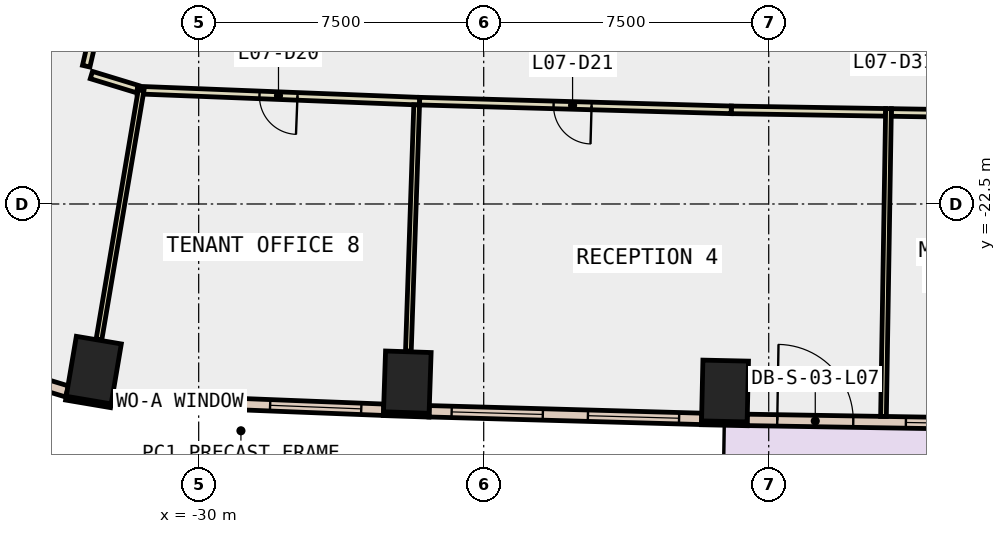
"""IFC4 building model, lengths in metres.
Left out: names, types, materials, properties, quantities, classifications, styles, units other than length and angle.
Written with IfcOpenShell. Run it as: python <this file> out.ifc"""

import sys

from ifc_helpers import new_model, si_unit, direction, frame, frame_2d, origin, origin_2d, place, context, subcontext, project, spatial, rectangle, extrude, element, fill, save


model = new_model("IFC4")
c1 = context("Model", 3, precision=1e-05, world=origin(), true_north=direction((0.0, 1.0)))
c2 = subcontext(c1, "Body", "Model", "MODEL_VIEW")
j1 = project(units=[si_unit("LENGTHUNIT", "METRE"), si_unit("PLANEANGLEUNIT", "RADIAN")], contexts=[c1])
p1 = place(None, origin())
s1 = spatial("IfcSite", under=j1, at=p1, CompositionType="ELEMENT")
p2 = place(p1, origin())
s2 = spatial("IfcBuilding", under=s1, at=p2, CompositionType="ELEMENT")
p3 = place(p2, frame((0.0, 0.0, 39.2)))
s3 = spatial("IfcBuildingStorey", under=s2, at=p3, CompositionType="ELEMENT", Elevation=39.2)
for number, where, z_axis, x_axis in (
    (1, (-32.761, -26.871, -0.4), (0.0, 0.0, 1.0), (-0.986, 0.167, 0.0)),
    (2, (-24.51, -27.188, -0.4), (0.0, 0.0, 1.0), (-0.999, 0.034, 0.0)),
    (3, (-16.15, -27.421, -0.4), (0.0, 0.0, 1.0), (-1.0, 0.022, 0.0)),
):
    element("IfcColumn", number, at=place(p3, frame(where, z_axis=z_axis, x_axis=x_axis)), inside=s3, PredefinedType="COLUMN", context=c2, shape_type="SweptSolid", body=[
        extrude(rectangle(XDim=1.2, YDim=1.6, at=origin_2d()), origin(), (0.0, 0.0, 1.0), 4.2),
    ])
for number, where, z_axis, x_axis in (
    (4, (-33.494, -27.609, 0.0), (0.0, 0.0, 1.0), (0.986, -0.167, 0.0)),
    (5, (-25.138, -28.017, 0.0), (0.0, 0.0, 1.0), (0.999, -0.033, 0.0)),
):
    element("IfcWall", number, at=place(p3, frame(where, z_axis=z_axis, x_axis=x_axis)), inside=s3, PredefinedType="STANDARD", context=c2, shape_type="SweptSolid", body=[
        extrude(rectangle(XDim=1.2, YDim=0.1, at=frame_2d((0.6, 0.0))), origin(), (0.0, 0.0, 1.0), 3.8),
    ])
p4 = place(p3, frame((-16.769, -28.258, 0.0), z_axis=(0.0, 0.0, 1.0), x_axis=(0.99976752127, -0.021561618973, 0.0)))
e6 = element("IfcWall", 6, at=p4, inside=s3, PredefinedType="STANDARD", context=c2, shape_type="SweptSolid", body=[
    extrude(rectangle(XDim=1.2, YDim=0.1, at=frame_2d((0.6, 0.0))), origin(), (0.0, 0.0, 1.0), 3.8),
])
p5 = place(p3, frame((-32.282, -27.633, 0.0), z_axis=(0.0, 0.0, 1.0), x_axis=(0.999228146648, -0.039282450878, 0.0)))
e7 = element("IfcWall", 7, at=p5, inside=s3, PredefinedType="STANDARD", context=c2, shape_type="SweptSolid", body=[
    extrude(rectangle(XDim=7.154, YDim=0.3, at=frame_2d((3.577, 0.0))), origin(), (0.0, 0.0, 1.0), 3.8),
])
p6 = place(p5, frame((0.588, 0.0, 0.9)))
e8 = element("IfcOpeningElement", 8, at=p6, cuts=e7, PredefinedType="OPENING", context=c2, shape_type="SweptSolid", body=[
    extrude(rectangle(XDim=2.4, YDim=2.6, at=frame_2d((1.2, 1.3))), frame((0.0, 0.16, 0.0), z_axis=(0.0, -1.0, 0.0), x_axis=(1.0, 0.0, 0.0)), (0.0, 0.0, 1.0), 0.32),
])
p7 = place(p5, frame((4.165, 0.0, 0.9)))
e9 = element("IfcOpeningElement", 9, at=p7, cuts=e7, PredefinedType="OPENING", context=c2, shape_type="SweptSolid", body=[
    extrude(rectangle(XDim=2.4, YDim=2.6, at=frame_2d((1.2, 1.3))), frame((0.0, 0.16, 0.0), z_axis=(0.0, -1.0, 0.0), x_axis=(1.0, 0.0, 0.0)), (0.0, 0.0, 1.0), 0.32),
])
p8 = place(p3, frame((-23.936, -27.954, 0.0), z_axis=(0.0, 0.0, 1.0), x_axis=(0.999611502654, -0.02787191709, 0.0)))
e10 = element("IfcWall", 10, at=p8, inside=s3, PredefinedType="STANDARD", context=c2, shape_type="SweptSolid", body=[
    extrude(rectangle(XDim=7.174, YDim=0.3, at=frame_2d((3.587, 0.0))), origin(), (0.0, 0.0, 1.0), 3.8),
])
p9 = place(p8, frame((0.593, 0.0, 0.9)))
e11 = element("IfcOpeningElement", 11, at=p9, cuts=e10, PredefinedType="OPENING", context=c2, shape_type="SweptSolid", body=[
    extrude(rectangle(XDim=2.4, YDim=2.6, at=frame_2d((1.2, 1.3))), frame((0.0, 0.16, 0.0), z_axis=(0.0, -1.0, 0.0), x_axis=(1.0, 0.0, 0.0)), (0.0, 0.0, 1.0), 0.32),
])
p10 = place(p8, frame((4.18, 0.0, 0.9)))
e12 = element("IfcOpeningElement", 12, at=p10, cuts=e10, PredefinedType="OPENING", context=c2, shape_type="SweptSolid", body=[
    extrude(rectangle(XDim=2.4, YDim=2.6, at=frame_2d((1.2, 1.3))), frame((0.0, 0.16, 0.0), z_axis=(0.0, -1.0, 0.0), x_axis=(1.0, 0.0, 0.0)), (0.0, 0.0, 1.0), 0.32),
])
p11 = place(p3, frame((-15.568, -28.181, 0.0), z_axis=(0.0, 0.0, 1.0), x_axis=(0.999866467443, -0.016341581408, 0.0)))
e13 = element("IfcWall", 13, at=p11, inside=s3, PredefinedType="STANDARD", context=c2, shape_type="SweptSolid", body=[
    extrude(rectangle(XDim=7.171, YDim=0.3, at=frame_2d((3.585, 0.0))), origin(), (0.0, 0.0, 1.0), 3.8),
])
p12 = place(p11, frame((0.793, 0.0, 0.0)))
e14 = element("IfcOpeningElement", 14, at=p12, cuts=e13, PredefinedType="OPENING", context=c2, shape_type="SweptSolid", body=[
    extrude(rectangle(XDim=2.0, YDim=2.4, at=frame_2d((1.0, 1.2))), frame((0.0, 0.16, 0.0), z_axis=(0.0, -1.0, 0.0), x_axis=(1.0, 0.0, 0.0)), (0.0, 0.0, 1.0), 0.32),
])
p13 = place(p11, frame((4.178, 0.0, 0.9)))
e15 = element("IfcOpeningElement", 15, at=p13, cuts=e13, PredefinedType="OPENING", context=c2, shape_type="SweptSolid", body=[
    extrude(rectangle(XDim=2.4, YDim=2.6, at=frame_2d((1.2, 1.3))), frame((0.0, 0.16, 0.0), z_axis=(0.0, -1.0, 0.0), x_axis=(1.0, 0.0, 0.0)), (0.0, 0.0, 1.0), 0.32),
])
p14 = place(p3, frame((-36.507, -26.505, 0.0), z_axis=(0.0, 0.0, 1.0), x_axis=(0.95648967224, -0.291766185322, 0.0)))
e16 = element("IfcWall", 16, at=p14, inside=s3, PredefinedType="STANDARD", context=c2, shape_type="SweptSolid", body=[
    extrude(rectangle(XDim=3.181, YDim=0.3, at=frame_2d((1.591, 0.0))), origin(), (0.0, 0.0, 1.0), 3.8),
])
p15 = place(p14, frame((0.891, 0.0, 0.9)))
e17 = element("IfcOpeningElement", 17, at=p15, cuts=e16, PredefinedType="OPENING", context=c2, shape_type="SweptSolid", body=[
    extrude(rectangle(XDim=1.4, YDim=2.6, at=frame_2d((0.7, 1.3))), frame((0.0, 0.16, 0.0), z_axis=(0.0, -1.0, 0.0), x_axis=(1.0, 0.0, 0.0)), (0.0, 0.0, 1.0), 0.32),
])
p16 = place(p3, frame((-31.611, -19.477, 0.0), z_axis=(0.0, 0.0, 1.0), x_axis=(-0.956459113118, 0.291866347723, 0.0)))
e18 = element("IfcWall", 18, at=p16, inside=s3, PredefinedType="PARTITIONING", context=c2, shape_type="SweptSolid", body=[
    extrude(rectangle(XDim=1.268, YDim=0.2, at=frame_2d((0.634, 0.0))), origin(), (0.0, 0.0, 1.0), 3.8),
])
p17 = place(p3, frame((-32.96, -18.874, 0.0), z_axis=(0.0, 0.0, 1.0), x_axis=(0.226081445763, 0.974108402531, 0.0)))
e19 = element("IfcWall", 19, at=p17, inside=s3, PredefinedType="PARTITIONING", context=c2, shape_type="SweptSolid", body=[
    extrude(rectangle(XDim=1.371, YDim=0.2, at=frame_2d((0.686, 0.0))), origin(), (0.0, 0.0, 1.0), 3.8),
])
p18 = place(p3, frame((-24.186, -19.795, 0.0), z_axis=(0.0, 0.0, 1.0), x_axis=(-0.9992284676, 0.039274285953, 0.0)))
e20 = element("IfcWall", 20, at=p18, inside=s3, PredefinedType="PARTITIONING", context=c2, shape_type="SweptSolid", body=[
    extrude(rectangle(XDim=7.435, YDim=0.2, at=frame_2d((3.717, 0.0))), origin(), (0.0, 0.0, 1.0), 3.8),
])
p19 = place(p18, frame((3.217, 0.0, 0.0)))
e21 = element("IfcOpeningElement", 21, at=p19, cuts=e20, PredefinedType="OPENING", context=c2, shape_type="SweptSolid", body=[
    extrude(rectangle(XDim=1.0, YDim=2.1, at=frame_2d((0.5, 1.05))), frame((0.0, 0.11, 0.0), z_axis=(0.0, -1.0, 0.0), x_axis=(1.0, 0.0, 0.0)), (0.0, 0.0, 1.0), 0.22),
])
p20 = place(p3, frame((-11.924, -20.089, 0.0), z_axis=(0.0, 0.0, 1.0), x_axis=(-0.999867376665, 0.016285855216, 0.0)))
e22 = element("IfcWall", 22, at=p20, inside=s3, PredefinedType="PARTITIONING", context=c2, shape_type="SweptSolid", body=[
    extrude(rectangle(XDim=4.062, YDim=0.2, at=frame_2d((2.031, 0.0))), origin(), (0.0, 0.0, 1.0), 3.8),
])
p21 = place(p3, frame((-15.986, -20.023, 0.0), z_axis=(0.0, 0.0, 1.0), x_axis=(-0.999610256124, 0.027916587377, 0.0)))
e23 = element("IfcWall", 23, at=p21, inside=s3, PredefinedType="PARTITIONING", context=c2, shape_type="SweptSolid", body=[
    extrude(rectangle(XDim=8.203, YDim=0.2, at=frame_2d((4.102, 0.0))), origin(), (0.0, 0.0, 1.0), 3.8),
])
p22 = place(p21, frame((3.677, 0.0, 0.0)))
e24 = element("IfcOpeningElement", 24, at=p22, cuts=e23, PredefinedType="OPENING", context=c2, shape_type="SweptSolid", body=[
    extrude(rectangle(XDim=1.0, YDim=2.1, at=frame_2d((0.5, 1.05))), frame((0.0, 0.11, 0.0), z_axis=(0.0, -1.0, 0.0), x_axis=(1.0, 0.0, 0.0)), (0.0, 0.0, 1.0), 0.22),
])
p23 = place(p3, frame((-7.9, -20.155, 0.0), z_axis=(0.0, 0.0, 1.0), x_axis=(-0.999867846419, 0.016256989184, 0.0)))
e25 = element("IfcWall", 25, at=p23, inside=s3, PredefinedType="PARTITIONING", context=c2, shape_type="SweptSolid", body=[
    extrude(rectangle(XDim=3.875, YDim=0.2, at=frame_2d((1.937, 0.0))), origin(), (0.0, 0.0, 1.0), 3.8),
])
p24 = place(p3, frame((-31.515, -19.506, 0.0), z_axis=(0.0, 0.0, 1.0), x_axis=(-0.166785823947, -0.985993148521, 0.0)))
e26 = element("IfcWall", 26, at=p24, inside=s3, PredefinedType="PARTITIONING", context=c2, shape_type="SweptSolid", body=[
    extrude(rectangle(XDim=6.65, YDim=0.15, at=frame_2d((3.325, 0.0))), origin(), (0.0, 0.0, 1.0), 3.8),
])
p25 = place(p3, frame((-24.264, -19.892, 0.0), z_axis=(0.0, 0.0, 1.0), x_axis=(-0.033647289587, -0.999433769643, 0.0)))
e27 = element("IfcWall", 27, at=p25, inside=s3, PredefinedType="PARTITIONING", context=c2, shape_type="SweptSolid", body=[
    extrude(rectangle(XDim=6.479, YDim=0.15, at=frame_2d((3.24, 0.0))), origin(), (0.0, 0.0, 1.0), 3.8),
])
p26 = place(p3, frame((-11.848, -19.991, 0.0), z_axis=(0.0, 0.0, 1.0), x_axis=(-0.016305783899, -0.999867051868, 0.0)))
e28 = element("IfcWall", 28, at=p26, inside=s3, PredefinedType="PARTITIONING", context=c2, shape_type="SweptSolid", body=[
    extrude(rectangle(XDim=8.1, YDim=0.15, at=frame_2d((4.05, 0.0))), origin(), (0.0, 0.0, 1.0), 3.8),
])
p27 = place(p6, origin())
e29 = element("IfcWindow", 29, at=p27, inside=s3, PartitioningType="SINGLE_PANEL", PredefinedType="WINDOW", context=c2, shape_type="SweptSolid", body=[
    extrude(rectangle(XDim=2.4, YDim=2.6, at=frame_2d((1.2, 1.3))), frame((0.0, 0.03, 0.0), z_axis=(0.0, -1.0, 0.0), x_axis=(1.0, 0.0, 0.0)), (0.0, 0.0, 1.0), 0.06),
])
fill(e8, e29)
p28 = place(p7, origin())
e30 = element("IfcWindow", 30, at=p28, inside=s3, PartitioningType="SINGLE_PANEL", PredefinedType="WINDOW", context=c2, shape_type="SweptSolid", body=[
    extrude(rectangle(XDim=2.4, YDim=2.6, at=frame_2d((1.2, 1.3))), frame((0.0, 0.03, 0.0), z_axis=(0.0, -1.0, 0.0), x_axis=(1.0, 0.0, 0.0)), (0.0, 0.0, 1.0), 0.06),
])
fill(e9, e30)
p29 = place(p9, origin())
e31 = element("IfcWindow", 31, at=p29, inside=s3, PartitioningType="SINGLE_PANEL", PredefinedType="WINDOW", context=c2, shape_type="SweptSolid", body=[
    extrude(rectangle(XDim=2.4, YDim=2.6, at=frame_2d((1.2, 1.3))), frame((0.0, 0.03, 0.0), z_axis=(0.0, -1.0, 0.0), x_axis=(1.0, 0.0, 0.0)), (0.0, 0.0, 1.0), 0.06),
])
fill(e11, e31)
p30 = place(p10, origin())
e32 = element("IfcWindow", 32, at=p30, inside=s3, PartitioningType="SINGLE_PANEL", PredefinedType="WINDOW", context=c2, shape_type="SweptSolid", body=[
    extrude(rectangle(XDim=2.4, YDim=2.6, at=frame_2d((1.2, 1.3))), frame((0.0, 0.03, 0.0), z_axis=(0.0, -1.0, 0.0), x_axis=(1.0, 0.0, 0.0)), (0.0, 0.0, 1.0), 0.06),
])
fill(e12, e32)
p31 = place(p12, origin())
e33 = element("IfcDoor", 33, at=p31, inside=s3, OperationType="SLIDING_TO_LEFT", PredefinedType="DOOR", context=c2, shape_type="SweptSolid", body=[
    extrude(rectangle(XDim=2.0, YDim=2.4, at=frame_2d((1.0, 1.2))), frame((0.0, 0.025, 0.0), z_axis=(0.0, -1.0, 0.0), x_axis=(1.0, 0.0, 0.0)), (0.0, 0.0, 1.0), 0.05),
])
fill(e14, e33)
p32 = place(p13, origin())
e34 = element("IfcWindow", 34, at=p32, inside=s3, PartitioningType="SINGLE_PANEL", PredefinedType="WINDOW", context=c2, shape_type="SweptSolid", body=[
    extrude(rectangle(XDim=2.4, YDim=2.6, at=frame_2d((1.2, 1.3))), frame((0.0, 0.03, 0.0), z_axis=(0.0, -1.0, 0.0), x_axis=(1.0, 0.0, 0.0)), (0.0, 0.0, 1.0), 0.06),
])
fill(e15, e34)
p33 = place(p19, origin())
e35 = element("IfcDoor", 35, at=p33, inside=s3, OperationType="SINGLE_SWING_LEFT", PredefinedType="DOOR", context=c2, shape_type="SweptSolid", body=[
    extrude(rectangle(XDim=1.0, YDim=2.1, at=frame_2d((0.5, 1.05))), frame((0.0, 0.025, 0.0), z_axis=(0.0, -1.0, 0.0), x_axis=(1.0, 0.0, 0.0)), (0.0, 0.0, 1.0), 0.05),
])
fill(e21, e35)
p34 = place(p22, origin())
e36 = element("IfcDoor", 36, at=p34, inside=s3, OperationType="SINGLE_SWING_RIGHT", PredefinedType="DOOR", context=c2, shape_type="SweptSolid", body=[
    extrude(rectangle(XDim=1.0, YDim=2.1, at=frame_2d((0.5, 1.05))), frame((0.0, 0.025, 0.0), z_axis=(0.0, -1.0, 0.0), x_axis=(1.0, 0.0, 0.0)), (0.0, 0.0, 1.0), 0.05),
])
fill(e24, e36)
save(model, sys.argv[1])
